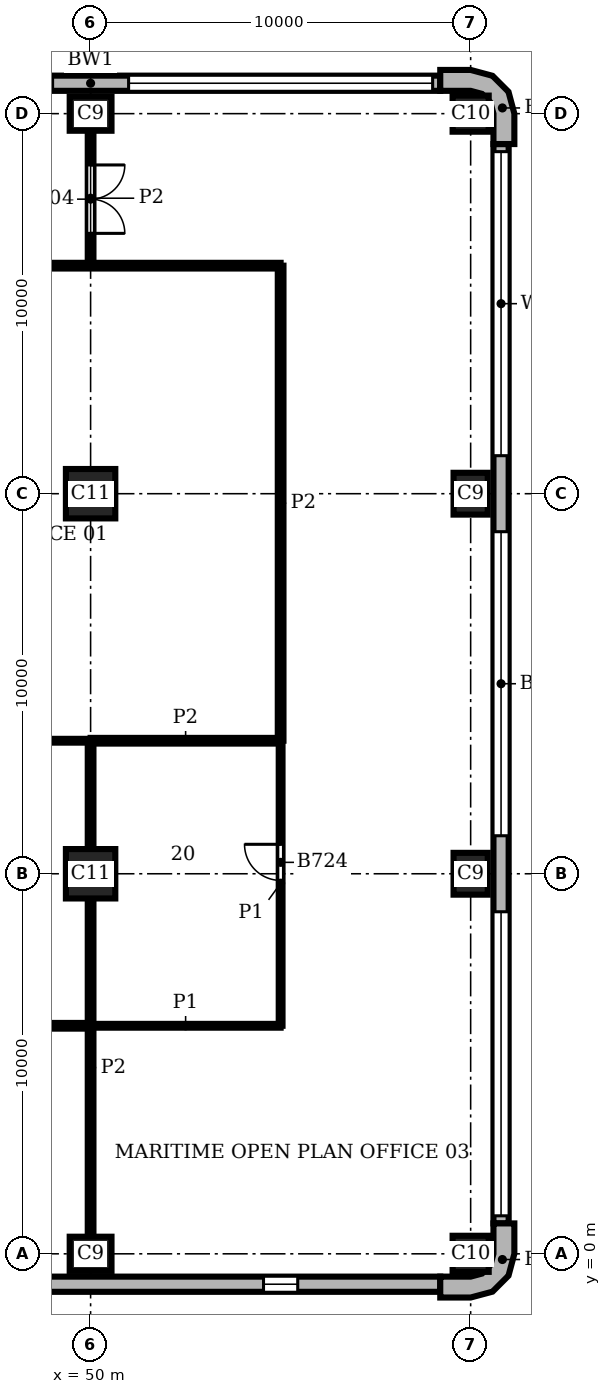
"""IFC4 building model, lengths in metres.
Left out: names, types, materials, properties, quantities, classifications, styles, units other than length and angle.
Written with IfcOpenShell. Run it as: python <this file> out.ifc"""

import sys

from ifc_helpers import new_model, si_unit, direction, frame, frame_2d, origin, origin_2d, place, context, subcontext, project, spatial, polyline, rectangle, outline, extrude, element, fill, save


model = new_model("IFC4")
c1 = context("Model", 3, precision=1e-05, world=origin(), true_north=direction((0.0, 1.0)))
c2 = subcontext(c1, "Body", "Model", "MODEL_VIEW")
j1 = project(units=[si_unit("LENGTHUNIT", "METRE"), si_unit("PLANEANGLEUNIT", "RADIAN")], contexts=[c1])
p1 = place(None, origin())
s1 = spatial("IfcSite", under=j1, at=p1, CompositionType="ELEMENT")
p2 = place(p1, origin())
s2 = spatial("IfcBuilding", under=s1, at=p2, CompositionType="ELEMENT")
p3 = place(p2, frame((0.0, 0.0, 201.9)))
s3 = spatial("IfcBuildingStorey", under=s2, at=p3, CompositionType="ELEMENT", Elevation=201.9)
p4 = place(p3, frame((50.0, 0.0, 0.0), z_axis=(0.0, 0.0, 1.0), x_axis=(1.0, 0.0, 0.0)))
e1 = element("IfcColumn", 1, at=p4, inside=s3, PredefinedType="COLUMN", context=c2, shape_type="SweptSolid", body=[
    extrude(rectangle(XDim=1.1, YDim=0.9, at=origin_2d()), origin(), (0.0, 0.0, 1.0), 3.9),
])
p5 = place(p3, frame((60.0, 0.0, 0.0), z_axis=(0.0, 0.0, 1.0), x_axis=(1.0, 0.0, 0.0)))
e2 = element("IfcColumn", 2, at=p5, inside=s3, PredefinedType="COLUMN", context=c2, shape_type="SweptSolid", body=[
    extrude(rectangle(XDim=0.95, YDim=0.95, at=origin_2d()), origin(), (0.0, 0.0, 1.0), 3.9),
])
for number, where, z_axis, x_axis in (
    (3, (60.0, 10.0, 0.0), (0.0, 0.0, 1.0), (0.0, 1.0, 0.0)),
    (4, (60.0, 20.0, 0.0), (0.0, 0.0, 1.0), (0.0, 1.0, 0.0)),
):
    element("IfcColumn", number, at=place(p3, frame(where, z_axis=z_axis, x_axis=x_axis)), inside=s3, PredefinedType="COLUMN", context=c2, shape_type="SweptSolid", body=[
        extrude(rectangle(XDim=1.1, YDim=0.9, at=origin_2d()), origin(), (0.0, 0.0, 1.0), 3.9),
    ])
p6 = place(p3, frame((60.0, 30.0, 0.0), z_axis=(0.0, 0.0, 1.0), x_axis=(1.0, 0.0, 0.0)))
e5 = element("IfcColumn", 5, at=p6, inside=s3, PredefinedType="COLUMN", context=c2, shape_type="SweptSolid", body=[
    extrude(rectangle(XDim=0.95, YDim=0.95, at=origin_2d()), origin(), (0.0, 0.0, 1.0), 3.9),
])
p7 = place(p3, frame((50.0, 30.0, 0.0), z_axis=(0.0, 0.0, 1.0), x_axis=(1.0, 0.0, 0.0)))
e6 = element("IfcColumn", 6, at=p7, inside=s3, PredefinedType="COLUMN", context=c2, shape_type="SweptSolid", body=[
    extrude(rectangle(XDim=1.1, YDim=0.9, at=origin_2d()), origin(), (0.0, 0.0, 1.0), 3.9),
])
for number, where, z_axis, x_axis in (
    (7, (50.0, 10.0, 0.0), (0.0, 0.0, 1.0), (1.0, 0.0, 0.0)),
    (8, (50.0, 20.0, 0.0), (0.0, 0.0, 1.0), (1.0, 0.0, 0.0)),
):
    element("IfcColumn", number, at=place(p3, frame(where, z_axis=z_axis, x_axis=x_axis)), inside=s3, PredefinedType="COLUMN", context=c2, shape_type="SweptSolid", body=[
        extrude(rectangle(XDim=1.3, YDim=1.3, at=origin_2d()), origin(), (0.0, 0.0, 1.0), 3.9),
    ])
p8 = place(p3, origin())
e9 = element("IfcWall", 9, at=p8, inside=s3, PredefinedType="SOLIDWALL", context=c2, shape_type="SweptSolid", body=[
    extrude(outline(polyline([(59.2, -1.0), (59.2, -1.15), (60.0, -1.15), (60.575, -0.996), (60.996, -0.575), (61.15, 0.0), (61.15, 0.8), (61.0, 0.8), (60.6, 0.8), (60.6, 0.0), (60.52, -0.3), (60.3, -0.52), (60.0, -0.6), (59.2, -0.6), (59.2, -1.0)])), origin(), (0.0, 0.0, 1.0), 3.9),
])
e10 = element("IfcWall", 10, at=p8, inside=s3, PredefinedType="SOLIDWALL", context=c2, shape_type="SweptSolid", body=[
    extrude(outline(polyline([(61.0, 29.2), (61.15, 29.2), (61.15, 30.0), (60.996, 30.575), (60.575, 30.996), (60.0, 31.15), (59.2, 31.15), (59.2, 31.0), (59.2, 30.6), (60.0, 30.6), (60.3, 30.52), (60.52, 30.3), (60.6, 30.0), (60.6, 29.2), (61.0, 29.2)])), origin(), (0.0, 0.0, 1.0), 3.9),
])
p9 = place(p3, frame((20.8, -0.8, 0.0), z_axis=(0.0, 0.0, 1.0), x_axis=(1.0, 0.0, 0.0)))
e11 = element("IfcWall", 11, at=p9, inside=s3, PredefinedType="SOLIDWALL", context=c2, shape_type="SweptSolid", body=[
    extrude(rectangle(XDim=38.4, YDim=0.4, at=frame_2d((19.2, 0.0))), origin(), (0.0, 0.0, 1.0), 3.9),
])
p10 = place(p9, frame((3.75, 0.0, 0.9)))
e12 = element("IfcOpeningElement", 12, at=p10, cuts=e11, PredefinedType="OPENING", context=c2, shape_type="SweptSolid", body=[
    extrude(rectangle(XDim=0.9, YDim=2.35, at=frame_2d((0.45, 1.175))), frame((0.0, 0.21, 0.0), z_axis=(0.0, -1.0, 0.0), x_axis=(1.0, 0.0, 0.0)), (0.0, 0.0, 1.0), 0.42),
])
p11 = place(p9, frame((13.75, 0.0, 0.9)))
e13 = element("IfcOpeningElement", 13, at=p11, cuts=e11, PredefinedType="OPENING", context=c2, shape_type="SweptSolid", body=[
    extrude(rectangle(XDim=0.9, YDim=2.35, at=frame_2d((0.45, 1.175))), frame((0.0, 0.21, 0.0), z_axis=(0.0, -1.0, 0.0), x_axis=(1.0, 0.0, 0.0)), (0.0, 0.0, 1.0), 0.42),
])
p12 = place(p9, frame((23.75, 0.0, 0.9)))
e14 = element("IfcOpeningElement", 14, at=p12, cuts=e11, PredefinedType="OPENING", context=c2, shape_type="SweptSolid", body=[
    extrude(rectangle(XDim=0.9, YDim=2.35, at=frame_2d((0.45, 1.175))), frame((0.0, 0.21, 0.0), z_axis=(0.0, -1.0, 0.0), x_axis=(1.0, 0.0, 0.0)), (0.0, 0.0, 1.0), 0.42),
])
p13 = place(p9, frame((33.75, 0.0, 0.9)))
e15 = element("IfcOpeningElement", 15, at=p13, cuts=e11, PredefinedType="OPENING", context=c2, shape_type="SweptSolid", body=[
    extrude(rectangle(XDim=0.9, YDim=2.35, at=frame_2d((0.45, 1.175))), frame((0.0, 0.21, 0.0), z_axis=(0.0, -1.0, 0.0), x_axis=(1.0, 0.0, 0.0)), (0.0, 0.0, 1.0), 0.42),
])
p14 = place(p3, frame((60.8, 0.8, 0.0), z_axis=(0.0, 0.0, 1.0), x_axis=(0.0, 1.0, 0.0)))
e16 = element("IfcWall", 16, at=p14, inside=s3, PredefinedType="SOLIDWALL", context=c2, shape_type="SweptSolid", body=[
    extrude(rectangle(XDim=28.4, YDim=0.4, at=frame_2d((14.2, 0.0))), origin(), (0.0, 0.0, 1.0), 3.9),
])
p15 = place(p14, frame((0.2, 0.0, 0.9)))
e17 = element("IfcOpeningElement", 17, at=p15, cuts=e16, PredefinedType="OPENING", context=c2, shape_type="SweptSolid", body=[
    extrude(rectangle(XDim=8.0, YDim=2.35, at=frame_2d((4.0, 1.175))), frame((0.0, 0.21, 0.0), z_axis=(0.0, -1.0, 0.0), x_axis=(1.0, 0.0, 0.0)), (0.0, 0.0, 1.0), 0.42),
])
p16 = place(p14, frame((10.2, 0.0, 0.9)))
e18 = element("IfcOpeningElement", 18, at=p16, cuts=e16, PredefinedType="OPENING", context=c2, shape_type="SweptSolid", body=[
    extrude(rectangle(XDim=8.0, YDim=2.35, at=frame_2d((4.0, 1.175))), frame((0.0, 0.21, 0.0), z_axis=(0.0, -1.0, 0.0), x_axis=(1.0, 0.0, 0.0)), (0.0, 0.0, 1.0), 0.42),
])
p17 = place(p14, frame((20.2, 0.0, 0.9)))
e19 = element("IfcOpeningElement", 19, at=p17, cuts=e16, PredefinedType="OPENING", context=c2, shape_type="SweptSolid", body=[
    extrude(rectangle(XDim=8.0, YDim=2.35, at=frame_2d((4.0, 1.175))), frame((0.0, 0.21, 0.0), z_axis=(0.0, -1.0, 0.0), x_axis=(1.0, 0.0, 0.0)), (0.0, 0.0, 1.0), 0.42),
])
p18 = place(p3, frame((59.2, 30.8, 0.0), z_axis=(0.0, 0.0, 1.0), x_axis=(-1.0, 0.0, 0.0)))
e20 = element("IfcWall", 20, at=p18, inside=s3, PredefinedType="SOLIDWALL", context=c2, shape_type="SweptSolid", body=[
    extrude(rectangle(XDim=18.4, YDim=0.4, at=frame_2d((9.2, 0.0))), origin(), (0.0, 0.0, 1.0), 3.9),
])
p19 = place(p18, frame((0.2, 0.0, 0.9)))
e21 = element("IfcOpeningElement", 21, at=p19, cuts=e20, PredefinedType="OPENING", context=c2, shape_type="SweptSolid", body=[
    extrude(rectangle(XDim=8.0, YDim=2.35, at=frame_2d((4.0, 1.175))), frame((0.0, 0.21, 0.0), z_axis=(0.0, -1.0, 0.0), x_axis=(1.0, 0.0, 0.0)), (0.0, 0.0, 1.0), 0.42),
])
p20 = place(p18, frame((10.2, 0.0, 0.9)))
e22 = element("IfcOpeningElement", 22, at=p20, cuts=e20, PredefinedType="OPENING", context=c2, shape_type="SweptSolid", body=[
    extrude(rectangle(XDim=8.0, YDim=2.35, at=frame_2d((4.0, 1.175))), frame((0.0, 0.21, 0.0), z_axis=(0.0, -1.0, 0.0), x_axis=(1.0, 0.0, 0.0)), (0.0, 0.0, 1.0), 0.42),
])
p21 = place(p3, frame((55.0, 6.0, 0.0), z_axis=(0.0, 0.0, 1.0), x_axis=(0.0, 1.0, 0.0)))
e23 = element("IfcWall", 23, at=p21, inside=s3, PredefinedType="PARTITIONING", context=c2, shape_type="SweptSolid", body=[
    extrude(rectangle(XDim=7.5, YDim=0.1, at=frame_2d((3.75, 0.0))), origin(), (0.0, 0.0, 1.0), 3.58),
])
p22 = place(p21, frame((3.825, 0.0, 0.0)))
e24 = element("IfcOpeningElement", 24, at=p22, cuts=e23, PredefinedType="OPENING", context=c2, shape_type="SweptSolid", body=[
    extrude(rectangle(XDim=0.95, YDim=2.1, at=frame_2d((0.475, 1.05))), frame((0.0, 0.06, 0.0), z_axis=(0.0, -1.0, 0.0), x_axis=(1.0, 0.0, 0.0)), (0.0, 0.0, 1.0), 0.12),
])
p23 = place(p3, frame((50.0, 6.0, 0.0), z_axis=(0.0, 0.0, 1.0), x_axis=(1.0, 0.0, 0.0)))
e25 = element("IfcWall", 25, at=p23, inside=s3, PredefinedType="PARTITIONING", context=c2, shape_type="SweptSolid", body=[
    extrude(rectangle(XDim=5.0, YDim=0.1, at=frame_2d((2.5, 0.0))), origin(), (0.0, 0.0, 1.0), 3.58),
])
p24 = place(p3, frame((45.0, 13.5, 0.0), z_axis=(0.0, 0.0, 1.0), x_axis=(1.0, 0.0, 0.0)))
e26 = element("IfcWall", 26, at=p24, inside=s3, PredefinedType="PARTITIONING", context=c2, shape_type="SweptSolid", body=[
    extrude(rectangle(XDim=5.0, YDim=0.1, at=frame_2d((2.5, 0.0))), origin(), (0.0, 0.0, 1.0), 3.58),
])
p25 = place(p24, frame((2.35, 0.0, 0.0)))
e27 = element("IfcOpeningElement", 27, at=p25, cuts=e26, PredefinedType="OPENING", context=c2, shape_type="SweptSolid", body=[
    extrude(rectangle(XDim=0.9, YDim=2.1, at=frame_2d((0.45, 1.05))), frame((0.0, 0.06, 0.0), z_axis=(0.0, -1.0, 0.0), x_axis=(1.0, 0.0, 0.0)), (0.0, 0.0, 1.0), 0.12),
])
p26 = place(p3, frame((50.0, 0.45, 0.0), z_axis=(0.0, 0.0, 1.0), x_axis=(0.0, 1.0, 0.0)))
e28 = element("IfcWall", 28, at=p26, inside=s3, PredefinedType="PARTITIONING", context=c2, shape_type="SweptSolid", body=[
    extrude(rectangle(XDim=8.9, YDim=0.15, at=frame_2d((4.45, 0.0))), origin(), (0.0, 0.0, 1.0), 3.58),
])
p27 = place(p3, frame((50.0, 10.65, 0.0), z_axis=(0.0, 0.0, 1.0), x_axis=(0.0, 1.0, 0.0)))
e29 = element("IfcWall", 29, at=p27, inside=s3, PredefinedType="PARTITIONING", context=c2, shape_type="SweptSolid", body=[
    extrude(rectangle(XDim=2.85, YDim=0.15, at=frame_2d((1.425, 0.0))), origin(), (0.0, 0.0, 1.0), 3.58),
])
p28 = place(p3, frame((50.0, 26.0, 0.0), z_axis=(0.0, 0.0, 1.0), x_axis=(0.0, 1.0, 0.0)))
e30 = element("IfcWall", 30, at=p28, inside=s3, PredefinedType="PARTITIONING", context=c2, shape_type="SweptSolid", body=[
    extrude(rectangle(XDim=3.55, YDim=0.15, at=frame_2d((1.775, 0.0))), origin(), (0.0, 0.0, 1.0), 3.58),
])
p29 = place(p28, frame((0.85, 0.0, 0.0)))
e31 = element("IfcOpeningElement", 31, at=p29, cuts=e30, PredefinedType="OPENING", context=c2, shape_type="SweptSolid", body=[
    extrude(rectangle(XDim=1.8, YDim=2.1, at=frame_2d((0.9, 1.05))), frame((0.0, 0.085, 0.0), z_axis=(0.0, -1.0, 0.0), x_axis=(1.0, 0.0, 0.0)), (0.0, 0.0, 1.0), 0.17),
])
p30 = place(p3, frame((55.0, 13.5, 0.0), z_axis=(0.0, 0.0, 1.0), x_axis=(0.0, 1.0, 0.0)))
e32 = element("IfcWall", 32, at=p30, inside=s3, PredefinedType="PARTITIONING", context=c2, shape_type="SweptSolid", body=[
    extrude(rectangle(XDim=12.5, YDim=0.15, at=frame_2d((6.25, 0.0))), origin(), (0.0, 0.0, 1.0), 3.58),
])
p31 = place(p3, frame((38.0, 6.0, 0.0), z_axis=(0.0, 0.0, 1.0), x_axis=(1.0, 0.0, 0.0)))
e33 = element("IfcWall", 33, at=p31, inside=s3, PredefinedType="PARTITIONING", context=c2, shape_type="SweptSolid", body=[
    extrude(rectangle(XDim=12.0, YDim=0.15, at=frame_2d((6.0, 0.0))), origin(), (0.0, 0.0, 1.0), 3.58),
])
p32 = place(p3, frame((50.0, 13.5, 0.0), z_axis=(0.0, 0.0, 1.0), x_axis=(1.0, 0.0, 0.0)))
e34 = element("IfcWall", 34, at=p32, inside=s3, PredefinedType="PARTITIONING", context=c2, shape_type="SweptSolid", body=[
    extrude(rectangle(XDim=5.0, YDim=0.15, at=frame_2d((2.5, 0.0))), origin(), (0.0, 0.0, 1.0), 3.58),
])
p33 = place(p3, frame((33.2, 26.0, 0.0), z_axis=(0.0, 0.0, 1.0), x_axis=(1.0, 0.0, 0.0)))
e35 = element("IfcWall", 35, at=p33, inside=s3, PredefinedType="PARTITIONING", context=c2, shape_type="SweptSolid", body=[
    extrude(rectangle(XDim=21.8, YDim=0.15, at=frame_2d((10.9, 0.0))), origin(), (0.0, 0.0, 1.0), 3.58),
])
p34 = place(p33, frame((10.15, 0.0, 0.0)))
e36 = element("IfcOpeningElement", 36, at=p34, cuts=e35, PredefinedType="OPENING", context=c2, shape_type="SweptSolid", body=[
    extrude(rectangle(XDim=1.8, YDim=2.1, at=frame_2d((0.9, 1.05))), frame((0.0, 0.085, 0.0), z_axis=(0.0, -1.0, 0.0), x_axis=(1.0, 0.0, 0.0)), (0.0, 0.0, 1.0), 0.17),
])
p35 = place(p13, origin())
e37 = element("IfcWindow", 37, at=p35, inside=s3, PartitioningType="SINGLE_PANEL", PredefinedType="WINDOW", context=c2, shape_type="SweptSolid", body=[
    extrude(rectangle(XDim=0.9, YDim=2.35, at=frame_2d((0.45, 1.175))), frame((0.0, 0.16, 0.0), z_axis=(0.0, -1.0, 0.0), x_axis=(1.0, 0.0, 0.0)), (0.0, 0.0, 1.0), 0.06),
])
fill(e15, e37)
p36 = place(p15, origin())
e38 = element("IfcWindow", 38, at=p36, inside=s3, PartitioningType="SINGLE_PANEL", PredefinedType="WINDOW", context=c2, shape_type="SweptSolid", body=[
    extrude(rectangle(XDim=8.0, YDim=2.35, at=frame_2d((4.0, 1.175))), frame((0.0, 0.16, 0.0), z_axis=(0.0, -1.0, 0.0), x_axis=(1.0, 0.0, 0.0)), (0.0, 0.0, 1.0), 0.06),
])
fill(e17, e38)
p37 = place(p16, origin())
e39 = element("IfcWindow", 39, at=p37, inside=s3, PartitioningType="SINGLE_PANEL", PredefinedType="WINDOW", context=c2, shape_type="SweptSolid", body=[
    extrude(rectangle(XDim=8.0, YDim=2.35, at=frame_2d((4.0, 1.175))), frame((0.0, 0.16, 0.0), z_axis=(0.0, -1.0, 0.0), x_axis=(1.0, 0.0, 0.0)), (0.0, 0.0, 1.0), 0.06),
])
fill(e18, e39)
p38 = place(p17, origin())
e40 = element("IfcWindow", 40, at=p38, inside=s3, PartitioningType="SINGLE_PANEL", PredefinedType="WINDOW", context=c2, shape_type="SweptSolid", body=[
    extrude(rectangle(XDim=8.0, YDim=2.35, at=frame_2d((4.0, 1.175))), frame((0.0, 0.16, 0.0), z_axis=(0.0, -1.0, 0.0), x_axis=(1.0, 0.0, 0.0)), (0.0, 0.0, 1.0), 0.06),
])
fill(e19, e40)
p39 = place(p19, origin())
e41 = element("IfcWindow", 41, at=p39, inside=s3, PartitioningType="SINGLE_PANEL", PredefinedType="WINDOW", context=c2, shape_type="SweptSolid", body=[
    extrude(rectangle(XDim=8.0, YDim=2.35, at=frame_2d((4.0, 1.175))), frame((0.0, 0.16, 0.0), z_axis=(0.0, -1.0, 0.0), x_axis=(1.0, 0.0, 0.0)), (0.0, 0.0, 1.0), 0.06),
])
fill(e21, e41)
p40 = place(p29, frame((1.8, 0.0, 0.0), z_axis=(0.0, 0.0, 1.0), x_axis=(-1.0, 0.0, 0.0)))
e42 = element("IfcDoor", 42, at=p40, inside=s3, OperationType="DOUBLE_DOOR_SINGLE_SWING", PredefinedType="DOOR", context=c2, shape_type="SweptSolid", body=[
    extrude(rectangle(XDim=1.8, YDim=2.1, at=frame_2d((0.9, 1.05))), frame((0.0, 0.025, 0.0), z_axis=(0.0, -1.0, 0.0), x_axis=(1.0, 0.0, 0.0)), (0.0, 0.0, 1.0), 0.05),
])
fill(e31, e42)
p41 = place(p22, origin())
e43 = element("IfcDoor", 43, at=p41, inside=s3, OperationType="SINGLE_SWING_RIGHT", PredefinedType="DOOR", context=c2, shape_type="SweptSolid", body=[
    extrude(rectangle(XDim=0.95, YDim=2.1, at=frame_2d((0.475, 1.05))), frame((0.0, 0.025, 0.0), z_axis=(0.0, -1.0, 0.0), x_axis=(1.0, 0.0, 0.0)), (0.0, 0.0, 1.0), 0.05),
])
fill(e24, e43)
save(model, sys.argv[1])
